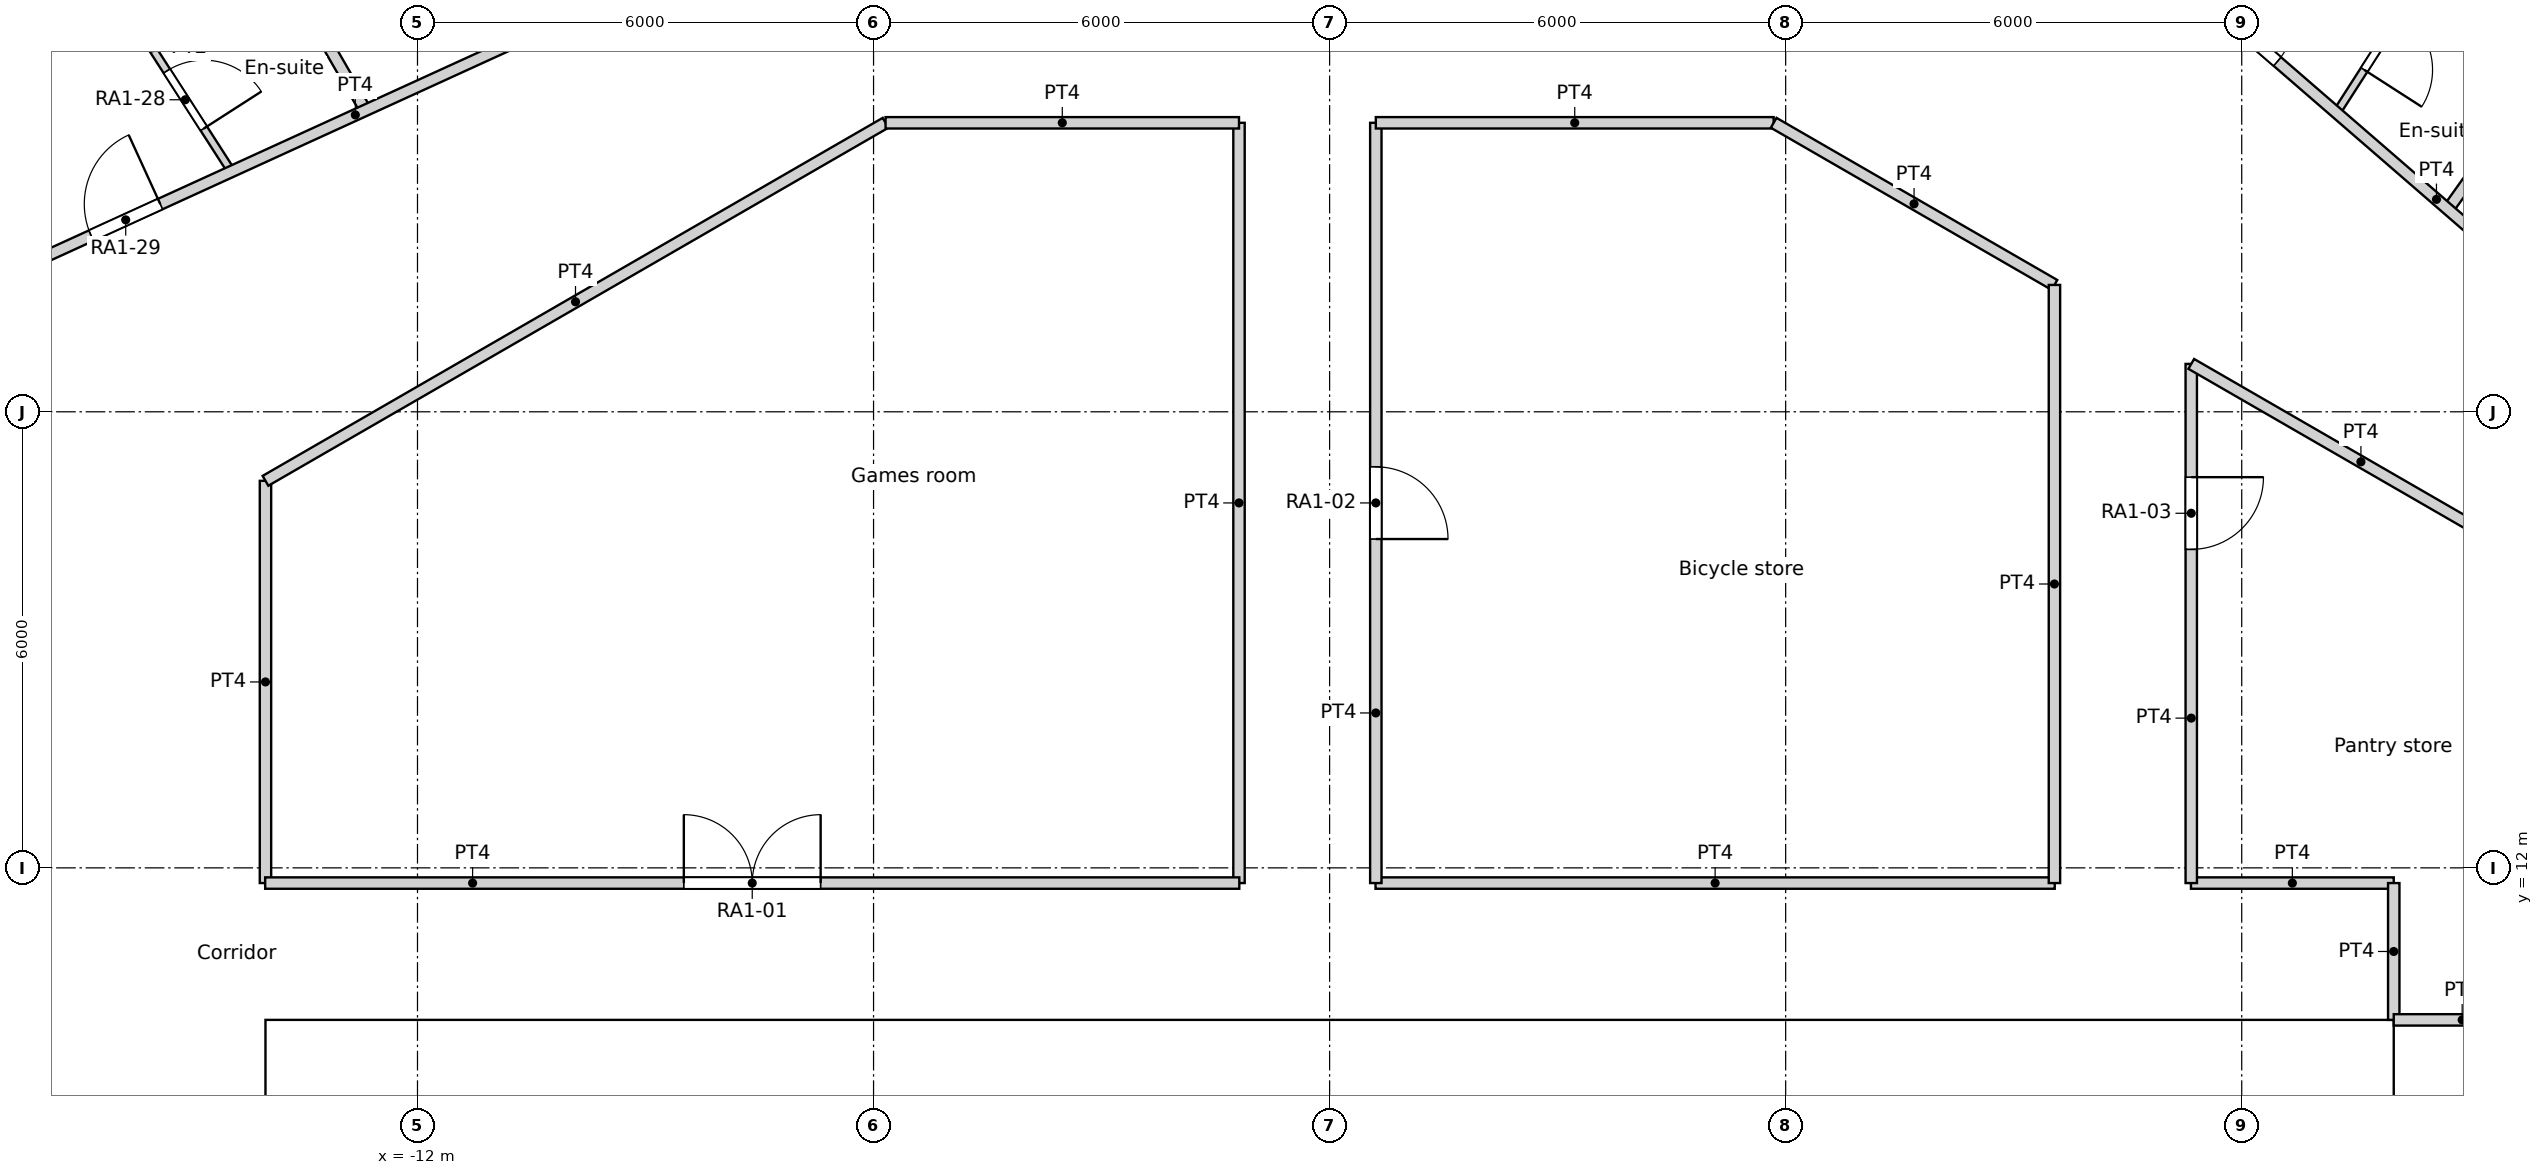
"""IFC4 building model, lengths in metres.
Left out: names, types, materials, properties, quantities, classifications, styles, units other than length and angle.
Written with IfcOpenShell. Run it as: python <this file> out.ifc"""

import sys

from ifc_helpers import new_model, si_unit, direction, frame, frame_2d, origin, origin_2d, place, context, subcontext, project, spatial, rectangle, circle, extrude, element, fill, save


model = new_model("IFC4")
c1 = context("Model", 3, precision=1e-05, world=origin(), true_north=direction((0.0, 1.0)))
c2 = subcontext(c1, "Body", "Model", "MODEL_VIEW")
j1 = project(units=[si_unit("LENGTHUNIT", "METRE"), si_unit("PLANEANGLEUNIT", "RADIAN")], contexts=[c1])
p1 = place(None, origin())
s1 = spatial("IfcSite", under=j1, at=p1, CompositionType="ELEMENT")
p2 = place(p1, origin())
s2 = spatial("IfcBuilding", under=s1, at=p2, CompositionType="ELEMENT")
p3 = place(p2, frame((0.0, 0.0, 28.2)))
s3 = spatial("IfcBuildingStorey", under=s2, at=p3, CompositionType="ELEMENT", Elevation=28.2)
for number, where, z_axis, x_axis in (
    (1, (14.659, 19.69, 0.0), (0.0, 0.0, 1.0), (1.0, 0.0, 0.0)),
    (2, (9.723, 22.54, 0.0), (0.0, 0.0, 1.0), (1.0, 0.0, 0.0)),
    (3, (-12.274, 21.259, 0.0), (0.0, 0.0, 1.0), (1.0, 0.0, 0.0)),
    (4, (-16.846, 17.855, 0.0), (0.0, 0.0, 1.0), (1.0, 0.0, 0.0)),
):
    element("IfcColumn", number, at=place(p3, frame(where, z_axis=z_axis, x_axis=x_axis)), inside=s3, PredefinedType="COLUMN", context=c2, shape_type="SweptSolid", body=[
        extrude(circle(Radius=0.75, at=origin_2d()), origin(), (0.0, 0.0, 1.0), 3.6),
    ])
for number, where, z_axis, x_axis in (
    (5, (15.552, 10.603, 0.0), (0.0, 0.0, 1.0), (1.0, 0.0, 0.0)),
    (6, (11.735, 14.716, 0.0), (0.0, 0.0, 1.0), (1.0, 0.0, 0.0)),
    (7, (6.876, 17.521, 0.0), (0.0, 0.0, 1.0), (1.0, 0.0, 0.0)),
    (8, (1.406, 18.77, 0.0), (0.0, 0.0, 1.0), (1.0, 0.0, 0.0)),
    (9, (-4.188, 18.35, 0.0), (0.0, 0.0, 1.0), (1.0, 0.0, 0.0)),
    (10, (-9.411, 16.301, 0.0), (0.0, 0.0, 1.0), (1.0, 0.0, 0.0)),
    (11, (-13.798, 12.802, 0.0), (0.0, 0.0, 1.0), (1.0, 0.0, 0.0)),
):
    element("IfcColumn", number, at=place(p3, frame(where, z_axis=z_axis, x_axis=x_axis)), inside=s3, PredefinedType="COLUMN", context=c2, shape_type="SweptSolid", body=[
        extrude(circle(Radius=0.8, at=origin_2d()), origin(), (0.0, 0.0, 1.0), 3.6),
    ])
p4 = place(p3, frame((-14.0, 9.4, 0.0), z_axis=(0.0, 0.0, 1.0), x_axis=(1.0, 0.0, 0.0)))
e12 = element("IfcWall", 12, at=p4, inside=s3, PredefinedType="SOLIDWALL", context=c2, shape_type="SweptSolid", body=[
    extrude(rectangle(XDim=28.0, YDim=1.2, at=frame_2d((14.0, 0.0))), origin(), (0.0, 0.0, 1.0), 3.6),
])
p5 = place(p4, frame((9.8, 0.0, 0.0)))
e13 = element("IfcOpeningElement", 13, at=p5, cuts=e12, PredefinedType="OPENING", context=c2, shape_type="SweptSolid", body=[
    extrude(rectangle(XDim=1.8, YDim=2.1, at=frame_2d((0.9, 1.05))), frame((0.0, 0.6, 0.0), z_axis=(0.0, -1.0, 0.0), x_axis=(1.0, 0.0, 0.0)), (0.0, 0.0, 1.0), 1.2),
])
p6 = place(p3, frame((-14.004, 11.8, 0.0), z_axis=(0.0, 0.0, 1.0), x_axis=(1.0, 0.0, 0.0)))
e14 = element("IfcWall", 14, at=p6, inside=s3, PredefinedType="PARTITIONING", context=c2, shape_type="SweptSolid", body=[
    extrude(rectangle(XDim=12.816, YDim=0.15, at=frame_2d((6.408, 0.0))), origin(), (0.0, 0.0, 1.0), 3.15),
])
p7 = place(p6, frame((5.508, 0.0, 0.0)))
e15 = element("IfcOpeningElement", 15, at=p7, cuts=e14, PredefinedType="OPENING", context=c2, shape_type="SweptSolid", body=[
    extrude(rectangle(XDim=1.8, YDim=2.1, at=frame_2d((0.9, 1.05))), frame((0.0, 0.075, 0.0), z_axis=(0.0, -1.0, 0.0), x_axis=(1.0, 0.0, 0.0)), (0.0, 0.0, 1.0), 0.15),
])
p8 = place(p3, frame((0.604, 11.8, 0.0), z_axis=(0.0, 0.0, 1.0), x_axis=(1.0, 0.0, 0.0)))
e16 = element("IfcWall", 16, at=p8, inside=s3, PredefinedType="PARTITIONING", context=c2, shape_type="SweptSolid", body=[
    extrude(rectangle(XDim=8.936, YDim=0.15, at=frame_2d((4.468, 0.0))), origin(), (0.0, 0.0, 1.0), 3.15),
])
p9 = place(p3, frame((11.332, 11.8, 0.0), z_axis=(0.0, 0.0, 1.0), x_axis=(1.0, 0.0, 0.0)))
e17 = element("IfcWall", 17, at=p9, inside=s3, PredefinedType="PARTITIONING", context=c2, shape_type="SweptSolid", body=[
    extrude(rectangle(XDim=2.668, YDim=0.15, at=frame_2d((1.334, 0.0))), origin(), (0.0, 0.0, 1.0), 3.15),
])
for number, where, z_axis, x_axis in (
    (18, (14.0, 10.0, 0.0), (0.0, 0.0, 1.0), (0.0, 1.0, 0.0)),
    (19, (14.0, 10.0, 0.0), (0.0, 0.0, 1.0), (1.0, 0.0, 0.0)),
):
    element("IfcWall", number, at=place(p3, frame(where, z_axis=z_axis, x_axis=x_axis)), inside=s3, PredefinedType="PARTITIONING", context=c2, shape_type="SweptSolid", body=[
        extrude(rectangle(XDim=1.8, YDim=0.15, at=frame_2d((0.9, 0.0))), origin(), (0.0, 0.0, 1.0), 3.15),
    ])
p10 = place(p3, frame((10.932, 23.939, 0.0), z_axis=(0.0, 0.0, 1.0), x_axis=(0.755838982892, -0.654757536757, 0.0)))
e20 = element("IfcWall", 20, at=p10, inside=s3, PredefinedType="PARTITIONING", context=c2, shape_type="SweptSolid", body=[
    extrude(rectangle(XDim=14.83, YDim=0.15, at=frame_2d((7.415, 0.0))), origin(), (0.0, 0.0, 1.0), 3.15),
])
p11 = place(p10, frame((12.796, 0.0, 0.0)))
e21 = element("IfcOpeningElement", 21, at=p11, cuts=e20, PredefinedType="OPENING", context=c2, shape_type="SweptSolid", body=[
    extrude(rectangle(XDim=1.0, YDim=2.1, at=frame_2d((0.5, 1.05))), frame((0.0, 0.075, 0.0), z_axis=(0.0, -1.0, 0.0), x_axis=(1.0, 0.0, 0.0)), (0.0, 0.0, 1.0), 0.15),
])
p12 = place(p10, frame((7.572, 0.0, 0.0)))
e22 = element("IfcOpeningElement", 22, at=p12, cuts=e20, PredefinedType="OPENING", context=c2, shape_type="SweptSolid", body=[
    extrude(rectangle(XDim=1.0, YDim=2.1, at=frame_2d((0.5, 1.05))), frame((0.0, 0.075, 0.0), z_axis=(0.0, -1.0, 0.0), x_axis=(1.0, 0.0, 0.0)), (0.0, 0.0, 1.0), 0.15),
])
p13 = place(p10, frame((1.033, 0.0, 0.0)))
e23 = element("IfcOpeningElement", 23, at=p13, cuts=e20, PredefinedType="OPENING", context=c2, shape_type="SweptSolid", body=[
    extrude(rectangle(XDim=1.0, YDim=2.1, at=frame_2d((0.5, 1.05))), frame((0.0, 0.075, 0.0), z_axis=(0.0, -1.0, 0.0), x_axis=(1.0, 0.0, 0.0)), (0.0, 0.0, 1.0), 0.15),
])
p14 = place(p3, frame((-1.192, 11.8, 0.0), z_axis=(0.0, 0.0, 1.0), x_axis=(0.0, 1.0, 0.0)))
e24 = element("IfcWall", 24, at=p14, inside=s3, PredefinedType="PARTITIONING", context=c2, shape_type="SweptSolid", body=[
    extrude(rectangle(XDim=10.002, YDim=0.15, at=frame_2d((5.001, 0.0))), origin(), (0.0, 0.0, 1.0), 3.15),
])
p15 = place(p3, frame((-5.842, 21.802, 0.0), z_axis=(0.0, 0.0, 1.0), x_axis=(1.0, 0.0, 0.0)))
e25 = element("IfcWall", 25, at=p15, inside=s3, PredefinedType="PARTITIONING", context=c2, shape_type="SweptSolid", body=[
    extrude(rectangle(XDim=4.65, YDim=0.15, at=frame_2d((2.325, 0.0))), origin(), (0.0, 0.0, 1.0), 3.15),
])
p16 = place(p3, frame((-14.0, 17.092, 0.0), z_axis=(0.0, 0.0, 1.0), x_axis=(0.86602719091, 0.499996904595, 0.0)))
e26 = element("IfcWall", 26, at=p16, inside=s3, PredefinedType="PARTITIONING", context=c2, shape_type="SweptSolid", body=[
    extrude(rectangle(XDim=9.42, YDim=0.15, at=frame_2d((4.71, 0.0))), origin(), (0.0, 0.0, 1.0), 3.15),
])
p17 = place(p3, frame((-14.0, 11.8, 0.0), z_axis=(0.0, 0.0, 1.0), x_axis=(0.0, 1.0, 0.0)))
e27 = element("IfcWall", 27, at=p17, inside=s3, PredefinedType="PARTITIONING", context=c2, shape_type="SweptSolid", body=[
    extrude(rectangle(XDim=5.292, YDim=0.15, at=frame_2d((2.646, 0.0))), origin(), (0.0, 0.0, 1.0), 3.15),
])
p18 = place(p3, frame((9.536, 11.8, 0.0), z_axis=(0.0, 0.0, 1.0), x_axis=(0.0, 1.0, 0.0)))
e28 = element("IfcWall", 28, at=p18, inside=s3, PredefinedType="PARTITIONING", context=c2, shape_type="SweptSolid", body=[
    extrude(rectangle(XDim=7.869, YDim=0.15, at=frame_2d((3.935, 0.0))), origin(), (0.0, 0.0, 1.0), 3.15),
])
p19 = place(p3, frame((5.842, 21.802, 0.0), z_axis=(0.0, 0.0, 1.0), x_axis=(0.865983505205, -0.500072563448, 0.0)))
e29 = element("IfcWall", 29, at=p19, inside=s3, PredefinedType="PARTITIONING", context=c2, shape_type="SweptSolid", body=[
    extrude(rectangle(XDim=4.265, YDim=0.15, at=frame_2d((2.133, 0.0))), origin(), (0.0, 0.0, 1.0), 3.15),
])
p20 = place(p3, frame((0.608, 21.802, 0.0), z_axis=(0.0, 0.0, 1.0), x_axis=(1.0, 0.0, 0.0)))
e30 = element("IfcWall", 30, at=p20, inside=s3, PredefinedType="PARTITIONING", context=c2, shape_type="SweptSolid", body=[
    extrude(rectangle(XDim=5.234, YDim=0.15, at=frame_2d((2.617, 0.0))), origin(), (0.0, 0.0, 1.0), 3.15),
])
p21 = place(p3, frame((0.608, 11.8, 0.0), z_axis=(0.0, 0.0, 1.0), x_axis=(0.0, 1.0, 0.0)))
e31 = element("IfcWall", 31, at=p21, inside=s3, PredefinedType="PARTITIONING", context=c2, shape_type="SweptSolid", body=[
    extrude(rectangle(XDim=10.002, YDim=0.15, at=frame_2d((5.001, 0.0))), origin(), (0.0, 0.0, 1.0), 3.15),
])
p22 = place(p21, frame((4.526, 0.0, 0.0)))
e32 = element("IfcOpeningElement", 32, at=p22, cuts=e31, PredefinedType="OPENING", context=c2, shape_type="SweptSolid", body=[
    extrude(rectangle(XDim=0.95, YDim=2.1, at=frame_2d((0.475, 1.05))), frame((0.0, 0.075, 0.0), z_axis=(0.0, -1.0, 0.0), x_axis=(1.0, 0.0, 0.0)), (0.0, 0.0, 1.0), 0.15),
])
p23 = place(p3, frame((11.336, 18.63, 0.0), z_axis=(0.0, 0.0, 1.0), x_axis=(0.866063337164, -0.499934291702, 0.0)))
e33 = element("IfcWall", 33, at=p23, inside=s3, PredefinedType="PARTITIONING", context=c2, shape_type="SweptSolid", body=[
    extrude(rectangle(XDim=5.155, YDim=0.15, at=frame_2d((2.577, 0.0))), origin(), (0.0, 0.0, 1.0), 3.15),
])
p24 = place(p3, frame((11.336, 11.8, 0.0), z_axis=(0.0, 0.0, 1.0), x_axis=(0.0, 1.0, 0.0)))
e34 = element("IfcWall", 34, at=p24, inside=s3, PredefinedType="PARTITIONING", context=c2, shape_type="SweptSolid", body=[
    extrude(rectangle(XDim=6.83, YDim=0.15, at=frame_2d((3.415, 0.0))), origin(), (0.0, 0.0, 1.0), 3.15),
])
p25 = place(p24, frame((4.39, 0.0, 0.0)))
e35 = element("IfcOpeningElement", 35, at=p25, cuts=e34, PredefinedType="OPENING", context=c2, shape_type="SweptSolid", body=[
    extrude(rectangle(XDim=0.95, YDim=2.1, at=frame_2d((0.475, 1.05))), frame((0.0, 0.075, 0.0), z_axis=(0.0, -1.0, 0.0), x_axis=(1.0, 0.0, 0.0)), (0.0, 0.0, 1.0), 0.15),
])
p26 = place(p3, frame((-17.234, 19.888, 0.0), z_axis=(0.0, 0.0, 1.0), x_axis=(0.90953867323, 0.415619299238, 0.0)))
e36 = element("IfcWall", 36, at=p26, inside=s3, PredefinedType="PARTITIONING", context=c2, shape_type="SweptSolid", body=[
    extrude(rectangle(XDim=14.829, YDim=0.15, at=frame_2d((7.415, 0.0))), origin(), (0.0, 0.0, 1.0), 3.15),
])
p27 = place(p26, frame((12.797, 0.0, 0.0)))
e37 = element("IfcOpeningElement", 37, at=p27, cuts=e36, PredefinedType="OPENING", context=c2, shape_type="SweptSolid", body=[
    extrude(rectangle(XDim=1.0, YDim=2.1, at=frame_2d((0.5, 1.05))), frame((0.0, 0.075, 0.0), z_axis=(0.0, -1.0, 0.0), x_axis=(1.0, 0.0, 0.0)), (0.0, 0.0, 1.0), 0.15),
])
p28 = place(p26, frame((7.877, 0.0, 0.0)))
e38 = element("IfcOpeningElement", 38, at=p28, cuts=e36, PredefinedType="OPENING", context=c2, shape_type="SweptSolid", body=[
    extrude(rectangle(XDim=1.0, YDim=2.1, at=frame_2d((0.5, 1.05))), frame((0.0, 0.075, 0.0), z_axis=(0.0, -1.0, 0.0), x_axis=(1.0, 0.0, 0.0)), (0.0, 0.0, 1.0), 0.15),
])
p29 = place(p26, frame((1.034, 0.0, 0.0)))
e39 = element("IfcOpeningElement", 39, at=p29, cuts=e36, PredefinedType="OPENING", context=c2, shape_type="SweptSolid", body=[
    extrude(rectangle(XDim=1.0, YDim=2.1, at=frame_2d((0.5, 1.05))), frame((0.0, 0.075, 0.0), z_axis=(0.0, -1.0, 0.0), x_axis=(1.0, 0.0, 0.0)), (0.0, 0.0, 1.0), 0.15),
])
p30 = place(p3, frame((14.715, 20.664, 0.0), z_axis=(0.0, 0.0, 1.0), x_axis=(0.57995989616, 0.814645026282, 0.0)))
e40 = element("IfcWall", 40, at=p30, inside=s3, PredefinedType="PARTITIONING", context=c2, shape_type="SweptSolid", body=[
    extrude(rectangle(XDim=5.857, YDim=0.15, at=frame_2d((2.928, 0.0))), origin(), (0.0, 0.0, 1.0), 3.15),
])
p31 = place(p3, frame((14.46, 23.821, 0.0), z_axis=(0.0, 0.0, 1.0), x_axis=(0.841135728185, -0.540824081168, 0.0)))
e41 = element("IfcWall", 41, at=p31, inside=s3, PredefinedType="PARTITIONING", context=c2, shape_type="SweptSolid", body=[
    extrude(rectangle(XDim=2.041, YDim=0.1, at=frame_2d((1.021, 0.0))), origin(), (0.0, 0.0, 1.0), 3.15),
])
p32 = place(p3, frame((13.248, 21.935, 0.0), z_axis=(0.0, 0.0, 1.0), x_axis=(0.540597960994, 0.841281073464, 0.0)))
e42 = element("IfcWall", 42, at=p32, inside=s3, PredefinedType="PARTITIONING", context=c2, shape_type="SweptSolid", body=[
    extrude(rectangle(XDim=2.242, YDim=0.1, at=frame_2d((1.121, 0.0))), origin(), (0.0, 0.0, 1.0), 3.15),
])
p33 = place(p32, frame((0.671, 0.0, 0.0)))
e43 = element("IfcOpeningElement", 43, at=p33, cuts=e42, PredefinedType="OPENING", context=c2, shape_type="SweptSolid", body=[
    extrude(rectangle(XDim=0.9, YDim=2.04, at=frame_2d((0.45, 1.02))), frame((0.0, 0.05, 0.0), z_axis=(0.0, -1.0, 0.0), x_axis=(1.0, 0.0, 0.0)), (0.0, 0.0, 1.0), 0.1),
])
p34 = place(p3, frame((-15.612, 27.041, 0.0), z_axis=(0.0, 0.0, 1.0), x_axis=(0.499824700643, -0.866126589262, 0.0)))
e44 = element("IfcWall", 44, at=p34, inside=s3, PredefinedType="PARTITIONING", context=c2, shape_type="SweptSolid", body=[
    extrude(rectangle(XDim=5.856, YDim=0.15, at=frame_2d((2.928, 0.0))), origin(), (0.0, 0.0, 1.0), 3.15),
])
p35 = place(p3, frame((-15.661, 23.048, 0.0), z_axis=(0.0, 0.0, 1.0), x_axis=(0.540796133976, -0.841153696702, 0.0)))
e45 = element("IfcWall", 45, at=p35, inside=s3, PredefinedType="PARTITIONING", context=c2, shape_type="SweptSolid", body=[
    extrude(rectangle(XDim=2.241, YDim=0.1, at=frame_2d((1.121, 0.0))), origin(), (0.0, 0.0, 1.0), 3.15),
])
p36 = place(p35, frame((0.671, 0.0, 0.0)))
e46 = element("IfcOpeningElement", 46, at=p36, cuts=e45, PredefinedType="OPENING", context=c2, shape_type="SweptSolid", body=[
    extrude(rectangle(XDim=0.9, YDim=2.04, at=frame_2d((0.45, 1.02))), frame((0.0, 0.05, 0.0), z_axis=(0.0, -1.0, 0.0), x_axis=(1.0, 0.0, 0.0)), (0.0, 0.0, 1.0), 0.1),
])
p37 = place(p5, origin())
e47 = element("IfcDoor", 47, at=p37, inside=s3, OperationType="DOUBLE_DOOR_SINGLE_SWING", PredefinedType="DOOR", context=c2, shape_type="SweptSolid", body=[
    extrude(rectangle(XDim=1.8, YDim=2.1, at=frame_2d((0.9, 1.05))), frame((0.0, 0.025, 0.0), z_axis=(0.0, -1.0, 0.0), x_axis=(1.0, 0.0, 0.0)), (0.0, 0.0, 1.0), 0.05),
])
fill(e13, e47)
p38 = place(p7, origin())
e48 = element("IfcDoor", 48, at=p38, inside=s3, OperationType="DOUBLE_DOOR_SINGLE_SWING", PredefinedType="DOOR", context=c2, shape_type="SweptSolid", body=[
    extrude(rectangle(XDim=1.8, YDim=2.1, at=frame_2d((0.9, 1.05))), frame((0.0, 0.025, 0.0), z_axis=(0.0, -1.0, 0.0), x_axis=(1.0, 0.0, 0.0)), (0.0, 0.0, 1.0), 0.05),
])
fill(e15, e48)
p39 = place(p22, origin())
e49 = element("IfcDoor", 49, at=p39, inside=s3, OperationType="SINGLE_SWING_RIGHT", PredefinedType="DOOR", context=c2, shape_type="SweptSolid", body=[
    extrude(rectangle(XDim=0.95, YDim=2.1, at=frame_2d((0.475, 1.05))), frame((0.0, 0.025, 0.0), z_axis=(0.0, -1.0, 0.0), x_axis=(1.0, 0.0, 0.0)), (0.0, 0.0, 1.0), 0.05),
])
fill(e32, e49)
p40 = place(p25, origin())
e50 = element("IfcDoor", 50, at=p40, inside=s3, OperationType="SINGLE_SWING_LEFT", PredefinedType="DOOR", context=c2, shape_type="SweptSolid", body=[
    extrude(rectangle(XDim=0.95, YDim=2.1, at=frame_2d((0.475, 1.05))), frame((0.0, 0.025, 0.0), z_axis=(0.0, -1.0, 0.0), x_axis=(1.0, 0.0, 0.0)), (0.0, 0.0, 1.0), 0.05),
])
fill(e35, e50)
p41 = place(p33, origin())
e51 = element("IfcDoor", 51, at=p41, inside=s3, OperationType="SINGLE_SWING_RIGHT", PredefinedType="DOOR", context=c2, shape_type="SweptSolid", body=[
    extrude(rectangle(XDim=0.9, YDim=2.04, at=frame_2d((0.45, 1.02))), frame((0.0, 0.025, 0.0), z_axis=(0.0, -1.0, 0.0), x_axis=(1.0, 0.0, 0.0)), (0.0, 0.0, 1.0), 0.05),
])
fill(e43, e51)
p42 = place(p13, origin())
e52 = element("IfcDoor", 52, at=p42, inside=s3, OperationType="SINGLE_SWING_LEFT", PredefinedType="DOOR", context=c2, shape_type="SweptSolid", body=[
    extrude(rectangle(XDim=1.0, YDim=2.1, at=frame_2d((0.5, 1.05))), frame((0.0, 0.025, 0.0), z_axis=(0.0, -1.0, 0.0), x_axis=(1.0, 0.0, 0.0)), (0.0, 0.0, 1.0), 0.05),
])
fill(e23, e52)
p43 = place(p36, origin())
e53 = element("IfcDoor", 53, at=p43, inside=s3, OperationType="SINGLE_SWING_RIGHT", PredefinedType="DOOR", context=c2, shape_type="SweptSolid", body=[
    extrude(rectangle(XDim=0.9, YDim=2.04, at=frame_2d((0.45, 1.02))), frame((0.0, 0.025, 0.0), z_axis=(0.0, -1.0, 0.0), x_axis=(1.0, 0.0, 0.0)), (0.0, 0.0, 1.0), 0.05),
])
fill(e46, e53)
p44 = place(p29, origin())
e54 = element("IfcDoor", 54, at=p44, inside=s3, OperationType="SINGLE_SWING_RIGHT", PredefinedType="DOOR", context=c2, shape_type="SweptSolid", body=[
    extrude(rectangle(XDim=1.0, YDim=2.1, at=frame_2d((0.5, 1.05))), frame((0.0, 0.025, 0.0), z_axis=(0.0, -1.0, 0.0), x_axis=(1.0, 0.0, 0.0)), (0.0, 0.0, 1.0), 0.05),
])
fill(e39, e54)
save(model, sys.argv[1])
